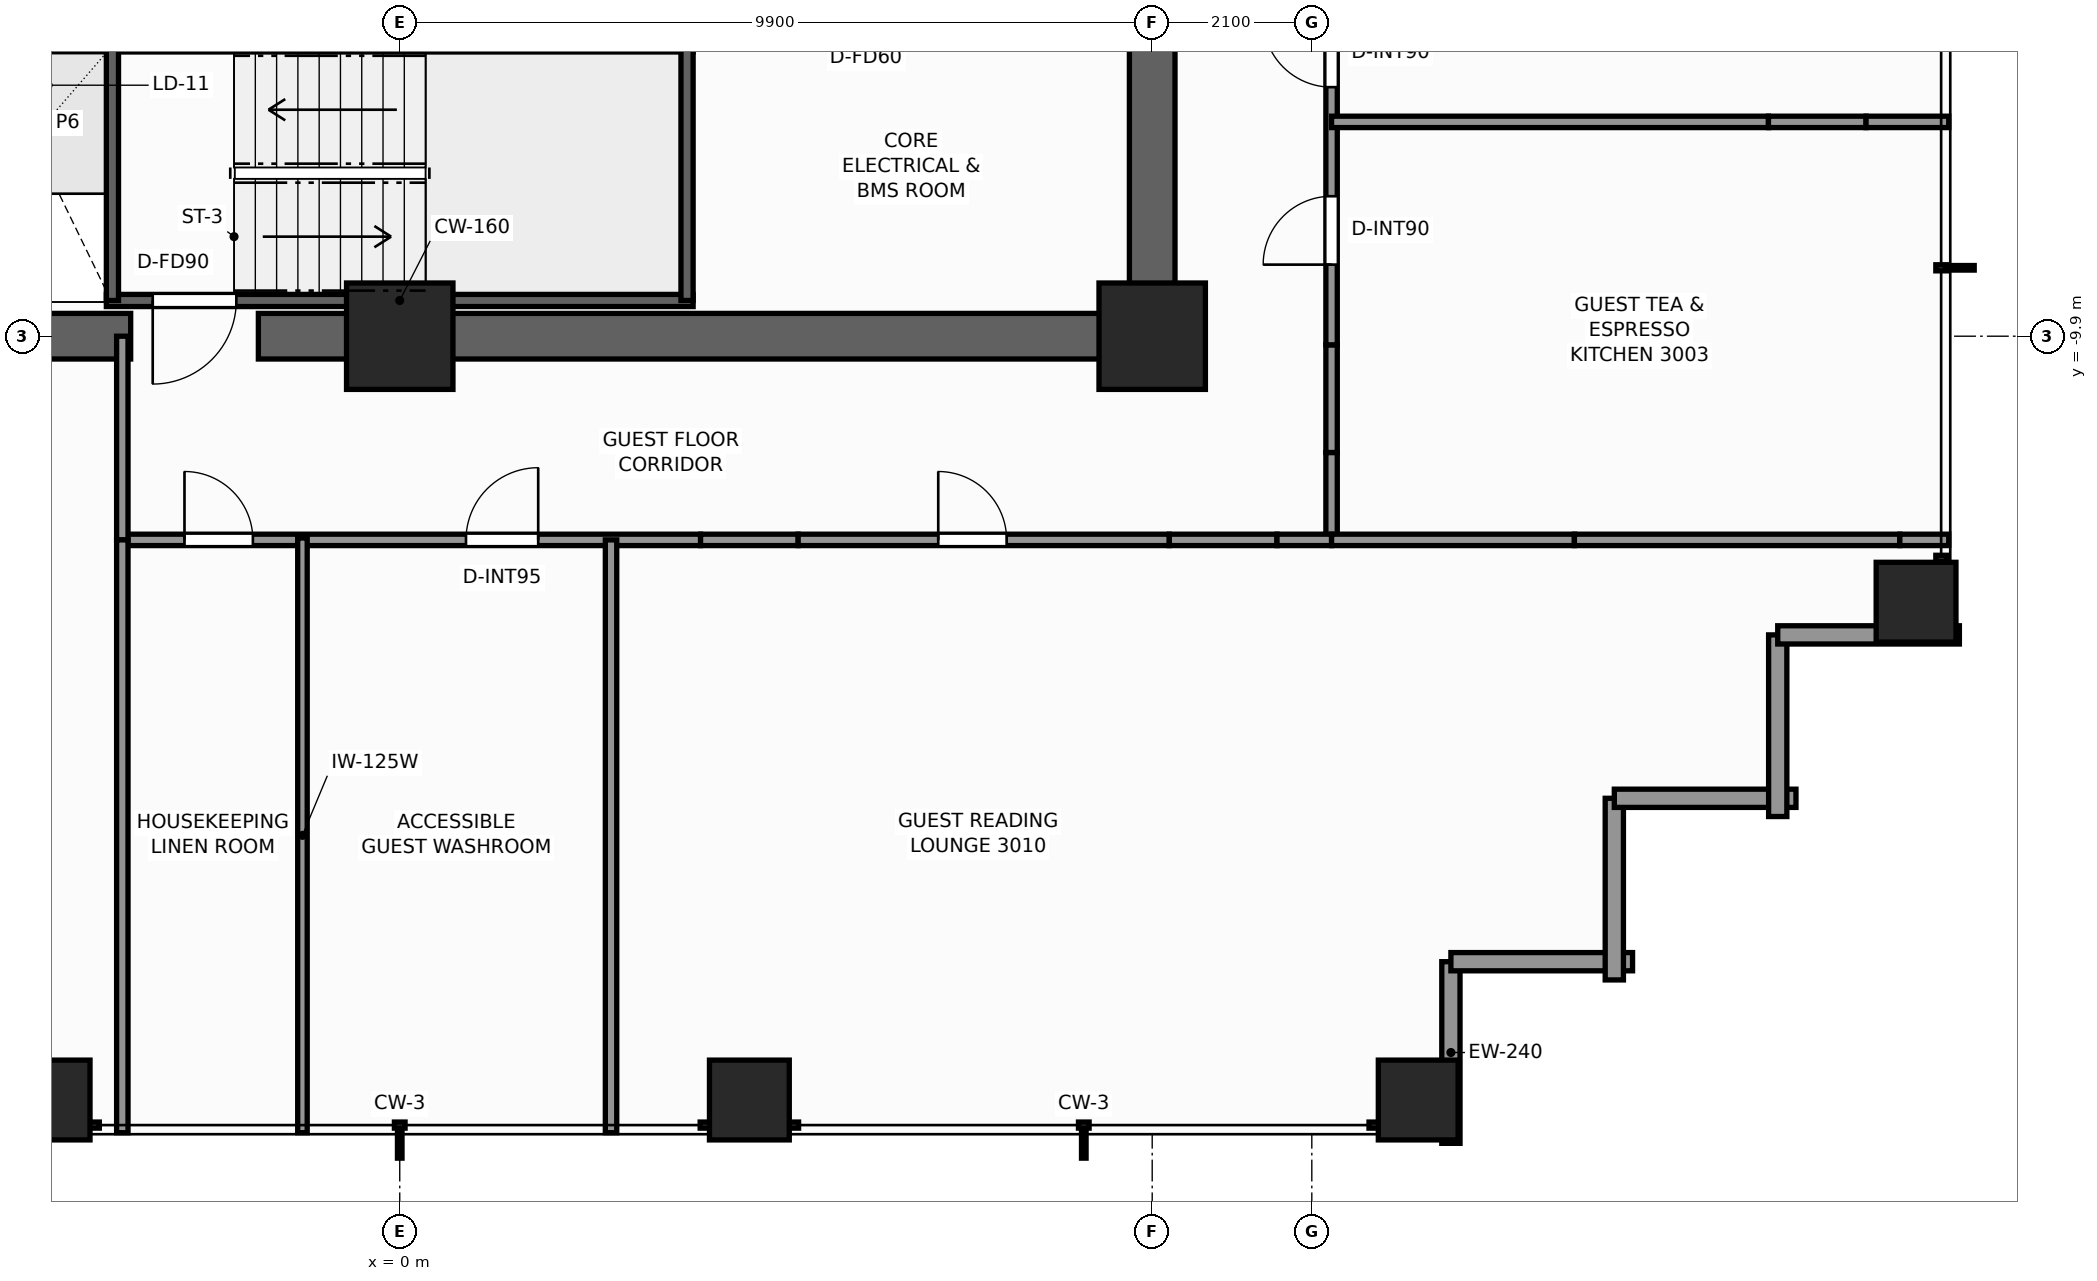
"""IFC4 building model, lengths in metres.
Left out: names, types, materials, properties, quantities, classifications, styles, units other than length and angle.
Written with IfcOpenShell. Run it as: python <this file> out.ifc"""

import sys

from ifc_helpers import new_model, si_unit, direction, frame, frame_2d, origin, origin_2d, place, context, subcontext, project, spatial, rectangle, extrude, element, fill, save


model = new_model("IFC4")
c1 = context("Model", 3, precision=1e-05, world=origin(), true_north=direction((0.0, 1.0)))
c2 = subcontext(c1, "Body", "Model", "MODEL_VIEW")
j1 = project(units=[si_unit("LENGTHUNIT", "METRE"), si_unit("PLANEANGLEUNIT", "RADIAN")], contexts=[c1])
p1 = place(None, origin())
s1 = spatial("IfcSite", under=j1, at=p1, CompositionType="ELEMENT")
p2 = place(p1, origin())
s2 = spatial("IfcBuilding", under=s1, at=p2, CompositionType="ELEMENT")
p3 = place(p2, frame((0.0, 0.0, 105.2)))
s3 = spatial("IfcBuildingStorey", under=s2, at=p3, CompositionType="ELEMENT", Elevation=105.2)
p4 = place(p3, frame((10.2, -9.9, 0.0), z_axis=(0.0, 0.0, 1.0), x_axis=(-1.0, 0.0, 0.0)))
e1 = element("IfcWall", 1, at=p4, inside=s3, PredefinedType="SHEAR", context=c2, shape_type="SweptSolid", body=[
    extrude(rectangle(XDim=12.06, YDim=0.6, at=frame_2d((6.03, 0.0))), origin(), (0.0, 0.0, 1.0), 3.3),
])
p5 = place(p3, frame((-3.54, -9.9, 0.0), z_axis=(0.0, 0.0, 1.0), x_axis=(-1.0, 0.0, 0.0)))
e2 = element("IfcWall", 2, at=p5, inside=s3, PredefinedType="SHEAR", context=c2, shape_type="SweptSolid", body=[
    extrude(rectangle(XDim=6.66, YDim=0.6, at=frame_2d((3.33, 0.0))), origin(), (0.0, 0.0, 1.0), 3.3),
])
p6 = place(p3, frame((9.9, -9.6, 0.0), z_axis=(0.0, 0.0, 1.0), x_axis=(0.0, 1.0, 0.0)))
e3 = element("IfcWall", 3, at=p6, inside=s3, PredefinedType="SHEAR", context=c2, shape_type="SweptSolid", body=[
    extrude(rectangle(XDim=4.05, YDim=0.6, at=frame_2d((2.025, 0.0))), origin(), (0.0, 0.0, 1.0), 3.3),
])
for number, where, z_axis, x_axis in (
    (4, (9.9, -9.9, 0.0), (0.0, 0.0, 1.0), (1.0, 0.0, 0.0)),
    (5, (0.0, -9.9, 0.0), (0.0, 0.0, 1.0), (1.0, 0.0, 0.0)),
):
    element("IfcColumn", number, at=place(p3, frame(where, z_axis=z_axis, x_axis=x_axis)), inside=s3, PredefinedType="COLUMN", context=c2, shape_type="SweptSolid", body=[
        extrude(rectangle(XDim=1.4, YDim=1.4, at=origin_2d()), origin(), (0.0, 0.0, 1.0), 3.3),
    ])
for number, where, z_axis, x_axis in (
    (6, (-4.6, -19.95, 0.0), (0.0, 0.0, 1.0), (1.0, 0.0, 0.0)),
    (7, (4.6, -19.95, 0.0), (0.0, 0.0, 1.0), (1.0, 0.0, 0.0)),
    (8, (13.4, -19.95, 0.0), (0.0, 0.0, 1.0), (1.0, 0.0, 0.0)),
    (9, (19.95, -13.4, 0.0), (0.0, 0.0, 1.0), (1.0, 0.0, 0.0)),
):
    element("IfcColumn", number, at=place(p3, frame(where, z_axis=z_axis, x_axis=x_axis)), inside=s3, PredefinedType="COLUMN", context=c2, shape_type="SweptSolid", body=[
        extrude(rectangle(XDim=1.05, YDim=1.05, at=origin_2d()), origin(), (0.0, 0.0, 1.0), 3.3),
    ])
p7 = place(p3, frame((13.83, -18.13, 0.0), z_axis=(0.0, 0.0, 1.0), x_axis=(0.0, -1.0, 0.0)))
e10 = element("IfcWall", 10, at=p7, inside=s3, PredefinedType="STANDARD", context=c2, shape_type="SweptSolid", body=[
    extrude(rectangle(XDim=2.39, YDim=0.24, at=frame_2d((1.195, 0.0))), origin(), (0.0, 0.0, 1.0), 1.275),
])
p8 = place(p3, frame((16.22, -18.13, 0.0), z_axis=(0.0, 0.0, 1.0), x_axis=(-1.0, 0.0, 0.0)))
e11 = element("IfcWall", 11, at=p8, inside=s3, PredefinedType="STANDARD", context=c2, shape_type="SweptSolid", body=[
    extrude(rectangle(XDim=2.39, YDim=0.24, at=frame_2d((1.195, 0.0))), origin(), (0.0, 0.0, 1.0), 1.275),
])
for number, where, z_axis, x_axis in (
    (12, (15.98, -15.98, 0.0), (0.0, 0.0, 1.0), (0.0, -1.0, 0.0)),
    (13, (18.37, -15.98, 0.0), (0.0, 0.0, 1.0), (-1.0, 0.0, 0.0)),
):
    element("IfcWall", number, at=place(p3, frame(where, z_axis=z_axis, x_axis=x_axis)), inside=s3, PredefinedType="STANDARD", context=c2, shape_type="SweptSolid", body=[
        extrude(rectangle(XDim=2.39, YDim=0.24, at=frame_2d((1.195, 0.0))), origin(), (0.0, 0.0, 1.0), 1.275),
    ])
p9 = place(p3, frame((18.13, -13.83, 0.0), z_axis=(0.0, 0.0, 1.0), x_axis=(0.0, -1.0, 0.0)))
e14 = element("IfcWall", 14, at=p9, inside=s3, PredefinedType="STANDARD", context=c2, shape_type="SweptSolid", body=[
    extrude(rectangle(XDim=2.39, YDim=0.24, at=frame_2d((1.195, 0.0))), origin(), (0.0, 0.0, 1.0), 1.275),
])
p10 = place(p3, frame((20.52, -13.83, 0.0), z_axis=(0.0, 0.0, 1.0), x_axis=(-1.0, 0.0, 0.0)))
e15 = element("IfcWall", 15, at=p10, inside=s3, PredefinedType="STANDARD", context=c2, shape_type="SweptSolid", body=[
    extrude(rectangle(XDim=2.39, YDim=0.24, at=frame_2d((1.195, 0.0))), origin(), (0.0, 0.0, 1.0), 1.275),
])
p11 = place(p3, frame((3.86, -9.43, 0.0), z_axis=(0.0, 0.0, 1.0), x_axis=(-1.0, 0.0, 0.0)))
e16 = element("IfcWall", 16, at=p11, inside=s3, PredefinedType="SHEAR", context=c2, shape_type="SweptSolid", body=[
    extrude(rectangle(XDim=7.72, YDim=0.16, at=frame_2d((3.86, 0.0))), origin(), (0.0, 0.0, 1.0), 3.3),
])
p12 = place(p11, frame((6.01, 0.0, 0.0)))
e17 = element("IfcOpeningElement", 17, at=p12, cuts=e16, PredefinedType="OPENING", context=c2, shape_type="SweptSolid", body=[
    extrude(rectangle(XDim=1.1, YDim=2.2, at=frame_2d((0.55, 1.1))), frame((0.0, 0.09, 0.0), z_axis=(0.0, -1.0, 0.0), x_axis=(1.0, 0.0, 0.0)), (0.0, 0.0, 1.0), 0.18),
])
for number, where, z_axis, x_axis in (
    (18, (-3.78, -9.43, 0.0), (0.0, 0.0, 1.0), (0.0, 1.0, 0.0)),
    (19, (3.78, -9.43, 0.0), (0.0, 0.0, 1.0), (0.0, 1.0, 0.0)),
):
    element("IfcWall", number, at=place(p3, frame(where, z_axis=z_axis, x_axis=x_axis)), inside=s3, PredefinedType="SHEAR", context=c2, shape_type="SweptSolid", body=[
        extrude(rectangle(XDim=3.35, YDim=0.16, at=frame_2d((1.675, 0.0))), origin(), (0.0, 0.0, 1.0), 3.3),
    ])
p13 = place(p3, frame((12.26, -12.58, 0.0), z_axis=(0.0, 0.0, 1.0), x_axis=(0.0, 1.0, 0.0)))
e20 = element("IfcWall", 20, at=p13, inside=s3, PredefinedType="PARTITIONING", context=c2, shape_type="SweptSolid", body=[
    extrude(rectangle(XDim=1.15, YDim=0.15, at=frame_2d((0.575, 0.0))), origin(), (0.0, 0.0, 1.0), 3.08),
])
p14 = place(p3, frame((12.26, -11.43, 0.0), z_axis=(0.0, 0.0, 1.0), x_axis=(0.0, 1.0, 0.0)))
e21 = element("IfcWall", 21, at=p14, inside=s3, PredefinedType="PARTITIONING", context=c2, shape_type="SweptSolid", body=[
    extrude(rectangle(XDim=1.417, YDim=0.15, at=frame_2d((0.708, 0.0))), origin(), (0.0, 0.0, 1.0), 1.265),
])
p15 = place(p3, frame((12.26, -10.013, 0.0), z_axis=(0.0, 0.0, 1.0), x_axis=(0.0, 1.0, 0.0)))
e22 = element("IfcWall", 22, at=p15, inside=s3, PredefinedType="PARTITIONING", context=c2, shape_type="SweptSolid", body=[
    extrude(rectangle(XDim=4.771, YDim=0.15, at=frame_2d((2.386, 0.0))), origin(), (0.0, 0.0, 1.0), 3.08),
])
p16 = place(p15, frame((1.055, 0.0, 0.0)))
e23 = element("IfcOpeningElement", 23, at=p16, cuts=e22, PredefinedType="OPENING", context=c2, shape_type="SweptSolid", body=[
    extrude(rectangle(XDim=0.9, YDim=2.06, at=frame_2d((0.45, 1.03))), frame((0.0, 0.085, 0.0), z_axis=(0.0, -1.0, 0.0), x_axis=(1.0, 0.0, 0.0)), (0.0, 0.0, 1.0), 0.17),
])
p17 = place(p15, frame((3.39, 0.0, 0.0)))
e24 = element("IfcOpeningElement", 24, at=p17, cuts=e22, PredefinedType="OPENING", context=c2, shape_type="SweptSolid", body=[
    extrude(rectangle(XDim=0.9, YDim=2.06, at=frame_2d((0.45, 1.03))), frame((0.0, 0.085, 0.0), z_axis=(0.0, -1.0, 0.0), x_axis=(1.0, 0.0, 0.0)), (0.0, 0.0, 1.0), 0.17),
])
p18 = place(p3, frame((-3.65, -12.58, 0.0), z_axis=(0.0, 0.0, 1.0), x_axis=(1.0, 0.0, 0.0)))
e25 = element("IfcWall", 25, at=p18, inside=s3, PredefinedType="PARTITIONING", context=c2, shape_type="SweptSolid", body=[
    extrude(rectangle(XDim=7.608, YDim=0.15, at=frame_2d((3.804, 0.0))), origin(), (0.0, 0.0, 1.0), 2.605),
])
p19 = place(p18, frame((0.818, 0.0, 0.0)))
e26 = element("IfcOpeningElement", 26, at=p19, cuts=e25, PredefinedType="OPENING", context=c2, shape_type="SweptSolid", body=[
    extrude(rectangle(XDim=0.9, YDim=2.06, at=frame_2d((0.45, 1.03))), frame((0.0, 0.085, 0.0), z_axis=(0.0, -1.0, 0.0), x_axis=(1.0, 0.0, 0.0)), (0.0, 0.0, 1.0), 0.17),
])
p20 = place(p18, frame((4.522, 0.0, 0.0)))
e27 = element("IfcOpeningElement", 27, at=p20, cuts=e25, PredefinedType="OPENING", context=c2, shape_type="SweptSolid", body=[
    extrude(rectangle(XDim=0.95, YDim=2.06, at=frame_2d((0.475, 1.03))), frame((0.0, 0.085, 0.0), z_axis=(0.0, -1.0, 0.0), x_axis=(1.0, 0.0, 0.0)), (0.0, 0.0, 1.0), 0.17),
])
p21 = place(p3, frame((3.958, -12.58, 0.0), z_axis=(0.0, 0.0, 1.0), x_axis=(1.0, 0.0, 0.0)))
e28 = element("IfcWall", 28, at=p21, inside=s3, PredefinedType="PARTITIONING", context=c2, shape_type="SweptSolid", body=[
    extrude(rectangle(XDim=1.284, YDim=0.15, at=frame_2d((0.642, 0.0))), origin(), (0.0, 0.0, 1.0), 1.265),
])
p22 = place(p3, frame((5.242, -12.58, 0.0), z_axis=(0.0, 0.0, 1.0), x_axis=(1.0, 0.0, 0.0)))
e29 = element("IfcWall", 29, at=p22, inside=s3, PredefinedType="PARTITIONING", context=c2, shape_type="SweptSolid", body=[
    extrude(rectangle(XDim=4.883, YDim=0.15, at=frame_2d((2.441, 0.0))), origin(), (0.0, 0.0, 1.0), 3.08),
])
p23 = place(p22, frame((1.843, 0.0, 0.0)))
e30 = element("IfcOpeningElement", 30, at=p23, cuts=e29, PredefinedType="OPENING", context=c2, shape_type="SweptSolid", body=[
    extrude(rectangle(XDim=0.9, YDim=2.06, at=frame_2d((0.45, 1.03))), frame((0.0, 0.085, 0.0), z_axis=(0.0, -1.0, 0.0), x_axis=(1.0, 0.0, 0.0)), (0.0, 0.0, 1.0), 0.17),
])
p24 = place(p3, frame((10.125, -12.58, 0.0), z_axis=(0.0, 0.0, 1.0), x_axis=(1.0, 0.0, 0.0)))
e31 = element("IfcWall", 31, at=p24, inside=s3, PredefinedType="PARTITIONING", context=c2, shape_type="SweptSolid", body=[
    extrude(rectangle(XDim=1.417, YDim=0.15, at=frame_2d((0.708, 0.0))), origin(), (0.0, 0.0, 1.0), 1.265),
])
p25 = place(p3, frame((11.542, -12.58, 0.0), z_axis=(0.0, 0.0, 1.0), x_axis=(1.0, 0.0, 0.0)))
e32 = element("IfcWall", 32, at=p25, inside=s3, PredefinedType="PARTITIONING", context=c2, shape_type="SweptSolid", body=[
    extrude(rectangle(XDim=0.718, YDim=0.15, at=frame_2d((0.359, 0.0))), origin(), (0.0, 0.0, 1.0), 3.08),
])
p26 = place(p3, frame((-3.65, -12.58, 0.0), z_axis=(0.0, 0.0, 1.0), x_axis=(0.0, 1.0, 0.0)))
e33 = element("IfcWall", 33, at=p26, inside=s3, PredefinedType="PARTITIONING", context=c2, shape_type="SweptSolid", body=[
    extrude(rectangle(XDim=2.68, YDim=0.15, at=frame_2d((1.34, 0.0))), origin(), (0.0, 0.0, 1.0), 3.08),
])
p27 = place(p3, frame((12.26, -12.58, 0.0), z_axis=(0.0, 0.0, 1.0), x_axis=(1.0, 0.0, 0.0)))
e34 = element("IfcWall", 34, at=p27, inside=s3, PredefinedType="PARTITIONING", context=c2, shape_type="SweptSolid", body=[
    extrude(rectangle(XDim=3.195, YDim=0.15, at=frame_2d((1.597, 0.0))), origin(), (0.0, 0.0, 1.0), 3.08),
])
p28 = place(p3, frame((15.455, -12.58, 0.0), z_axis=(0.0, 0.0, 1.0), x_axis=(1.0, 0.0, 0.0)))
e35 = element("IfcWall", 35, at=p28, inside=s3, PredefinedType="PARTITIONING", context=c2, shape_type="SweptSolid", body=[
    extrude(rectangle(XDim=4.281, YDim=0.15, at=frame_2d((2.141, 0.0))), origin(), (0.0, 0.0, 1.0), 1.265),
])
p29 = place(p3, frame((19.736, -12.58, 0.0), z_axis=(0.0, 0.0, 1.0), x_axis=(1.0, 0.0, 0.0)))
e36 = element("IfcWall", 36, at=p29, inside=s3, PredefinedType="PARTITIONING", context=c2, shape_type="SweptSolid", body=[
    extrude(rectangle(XDim=0.644, YDim=0.15, at=frame_2d((0.322, 0.0))), origin(), (0.0, 0.0, 1.0), 2.449),
])
p30 = place(p3, frame((12.26, -7.08, 0.0), z_axis=(0.0, 0.0, 1.0), x_axis=(1.0, 0.0, 0.0)))
e37 = element("IfcWall", 37, at=p30, inside=s3, PredefinedType="PARTITIONING", context=c2, shape_type="SweptSolid", body=[
    extrude(rectangle(XDim=5.748, YDim=0.15, at=frame_2d((2.874, 0.0))), origin(), (0.0, 0.0, 1.0), 3.08),
])
p31 = place(p3, frame((18.008, -7.08, 0.0), z_axis=(0.0, 0.0, 1.0), x_axis=(1.0, 0.0, 0.0)))
e38 = element("IfcWall", 38, at=p31, inside=s3, PredefinedType="PARTITIONING", context=c2, shape_type="SweptSolid", body=[
    extrude(rectangle(XDim=1.284, YDim=0.15, at=frame_2d((0.642, 0.0))), origin(), (0.0, 0.0, 1.0), 1.265),
])
p32 = place(p3, frame((19.292, -7.08, 0.0), z_axis=(0.0, 0.0, 1.0), x_axis=(1.0, 0.0, 0.0)))
e39 = element("IfcWall", 39, at=p32, inside=s3, PredefinedType="PARTITIONING", context=c2, shape_type="SweptSolid", body=[
    extrude(rectangle(XDim=1.088, YDim=0.15, at=frame_2d((0.544, 0.0))), origin(), (0.0, 0.0, 1.0), 2.449),
])
for number, where, z_axis, x_axis in (
    (40, (-3.65, -20.38, 0.0), (0.0, 0.0, 1.0), (0.0, 1.0, 0.0)),
    (41, (2.78, -20.38, 0.0), (0.0, 0.0, 1.0), (0.0, 1.0, 0.0)),
):
    element("IfcWall", number, at=place(p3, frame(where, z_axis=z_axis, x_axis=x_axis)), inside=s3, PredefinedType="PARTITIONING", context=c2, shape_type="SweptSolid", body=[
        extrude(rectangle(XDim=7.8, YDim=0.15, at=frame_2d((3.9, 0.0))), origin(), (0.0, 0.0, 1.0), 2.449),
    ])
p33 = place(p3, frame((-1.28, -20.38, 0.0), z_axis=(0.0, 0.0, 1.0), x_axis=(0.0, 1.0, 0.0)))
e42 = element("IfcWall", 42, at=p33, inside=s3, PredefinedType="PARTITIONING", context=c2, shape_type="SweptSolid", body=[
    extrude(rectangle(XDim=7.825, YDim=0.125, at=frame_2d((3.913, 0.0))), origin(), (0.0, 0.0, 1.0), 2.449),
])
p34 = place(p12, origin())
e43 = element("IfcDoor", 43, at=p34, inside=s3, OperationType="SINGLE_SWING_RIGHT", PredefinedType="DOOR", context=c2, shape_type="SweptSolid", body=[
    extrude(rectangle(XDim=1.1, YDim=2.2, at=frame_2d((0.55, 1.1))), frame((0.0, 0.025, 0.0), z_axis=(0.0, -1.0, 0.0), x_axis=(1.0, 0.0, 0.0)), (0.0, 0.0, 1.0), 0.05),
])
fill(e17, e43)
p35 = place(p16, origin())
e44 = element("IfcDoor", 44, at=p35, inside=s3, OperationType="SINGLE_SWING_LEFT", PredefinedType="DOOR", context=c2, shape_type="SweptSolid", body=[
    extrude(rectangle(XDim=0.9, YDim=2.06, at=frame_2d((0.45, 1.03))), frame((0.0, 0.025, 0.0), z_axis=(0.0, -1.0, 0.0), x_axis=(1.0, 0.0, 0.0)), (0.0, 0.0, 1.0), 0.05),
])
fill(e23, e44)
p36 = place(p17, origin())
e45 = element("IfcDoor", 45, at=p36, inside=s3, OperationType="SINGLE_SWING_RIGHT", PredefinedType="DOOR", context=c2, shape_type="SweptSolid", body=[
    extrude(rectangle(XDim=0.9, YDim=2.06, at=frame_2d((0.45, 1.03))), frame((0.0, 0.025, 0.0), z_axis=(0.0, -1.0, 0.0), x_axis=(1.0, 0.0, 0.0)), (0.0, 0.0, 1.0), 0.05),
])
fill(e24, e45)
p37 = place(p19, origin())
e46 = element("IfcDoor", 46, at=p37, inside=s3, OperationType="SINGLE_SWING_LEFT", PredefinedType="DOOR", context=c2, shape_type="SweptSolid", body=[
    extrude(rectangle(XDim=0.9, YDim=2.06, at=frame_2d((0.45, 1.03))), frame((0.0, 0.025, 0.0), z_axis=(0.0, -1.0, 0.0), x_axis=(1.0, 0.0, 0.0)), (0.0, 0.0, 1.0), 0.05),
])
fill(e26, e46)
p38 = place(p20, origin())
e47 = element("IfcDoor", 47, at=p38, inside=s3, OperationType="SINGLE_SWING_RIGHT", PredefinedType="DOOR", context=c2, shape_type="SweptSolid", body=[
    extrude(rectangle(XDim=0.95, YDim=2.06, at=frame_2d((0.475, 1.03))), frame((0.0, 0.025, 0.0), z_axis=(0.0, -1.0, 0.0), x_axis=(1.0, 0.0, 0.0)), (0.0, 0.0, 1.0), 0.05),
])
fill(e27, e47)
p39 = place(p23, origin())
e48 = element("IfcDoor", 48, at=p39, inside=s3, OperationType="SINGLE_SWING_LEFT", PredefinedType="DOOR", context=c2, shape_type="SweptSolid", body=[
    extrude(rectangle(XDim=0.9, YDim=2.06, at=frame_2d((0.45, 1.03))), frame((0.0, 0.025, 0.0), z_axis=(0.0, -1.0, 0.0), x_axis=(1.0, 0.0, 0.0)), (0.0, 0.0, 1.0), 0.05),
])
fill(e30, e48)
save(model, sys.argv[1])
